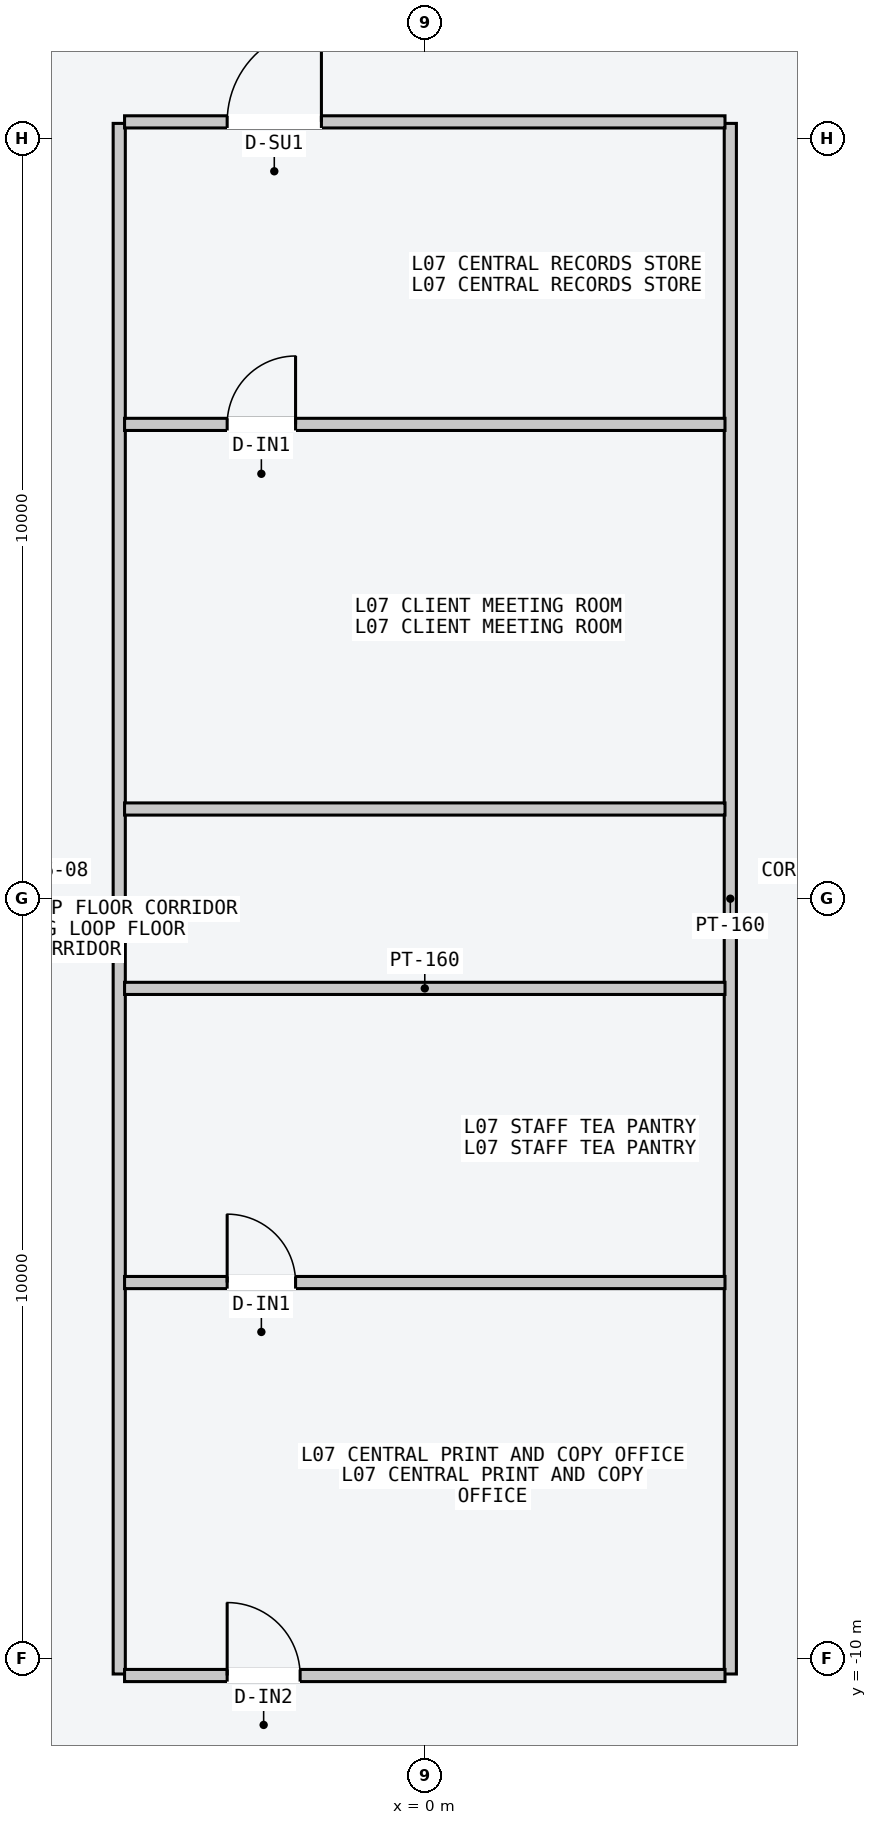
"""IFC4 building model, lengths in metres.
Left out: names, types, materials, properties, quantities, classifications, styles, units other than length and angle.
Written with IfcOpenShell. Run it as: python <this file> out.ifc"""

import sys

from ifc_helpers import new_model, si_unit, direction, frame, frame_2d, origin, place, context, subcontext, project, spatial, rectangle, extrude, element, fill, save


model = new_model("IFC4")
c1 = context("Model", 3, precision=1e-05, world=origin(), true_north=direction((0.0, 1.0)))
c2 = subcontext(c1, "Body", "Model", "MODEL_VIEW")
j1 = project(units=[si_unit("LENGTHUNIT", "METRE"), si_unit("PLANEANGLEUNIT", "RADIAN")], contexts=[c1])
p1 = place(None, origin())
s1 = spatial("IfcSite", under=j1, at=p1, CompositionType="ELEMENT")
p2 = place(p1, origin())
s2 = spatial("IfcBuilding", under=s1, at=p2, CompositionType="ELEMENT")
p3 = place(p2, frame((0.0, 0.0, 31.2)))
s3 = spatial("IfcBuildingStorey", under=s2, at=p3, CompositionType="ELEMENT", Elevation=31.2)
for number, where, z_axis, x_axis in (
    (1, (-4.02, -10.2, 0.0), (0.0, 0.0, 1.0), (0.0, 1.0, 0.0)),
    (2, (4.02, -10.2, 0.0), (0.0, 0.0, 1.0), (0.0, 1.0, 0.0)),
):
    element("IfcWall", number, at=place(p3, frame(where, z_axis=z_axis, x_axis=x_axis)), inside=s3, PredefinedType="PARTITIONING", context=c2, shape_type="SweptSolid", body=[
        extrude(rectangle(XDim=20.4, YDim=0.16, at=frame_2d((10.2, 0.0))), origin(), (0.0, 0.0, 1.0), 3.4),
    ])
p4 = place(p3, frame((-3.95, 1.18, 0.0), z_axis=(0.0, 0.0, 1.0), x_axis=(1.0, 0.0, 0.0)))
e3 = element("IfcWall", 3, at=p4, inside=s3, PredefinedType="PARTITIONING", context=c2, shape_type="SweptSolid", body=[
    extrude(rectangle(XDim=7.9, YDim=0.16, at=frame_2d((3.95, 0.0))), origin(), (0.0, 0.0, 1.0), 3.4),
])
p5 = place(p3, frame((-3.95, 10.22, 0.0), z_axis=(0.0, 0.0, 1.0), x_axis=(1.0, 0.0, 0.0)))
e4 = element("IfcWall", 4, at=p5, inside=s3, PredefinedType="PARTITIONING", context=c2, shape_type="SweptSolid", body=[
    extrude(rectangle(XDim=7.9, YDim=0.16, at=frame_2d((3.95, 0.0))), origin(), (0.0, 0.0, 1.0), 3.4),
])
p6 = place(p5, frame((1.35, 0.0, 0.0)))
e5 = element("IfcOpeningElement", 5, at=p6, cuts=e4, PredefinedType="OPENING", context=c2, shape_type="SweptSolid", body=[
    extrude(rectangle(XDim=1.24, YDim=2.24, at=frame_2d((0.62, 1.12))), frame((0.0, 0.09, 0.0), z_axis=(0.0, -1.0, 0.0), x_axis=(1.0, 0.0, 0.0)), (0.0, 0.0, 1.0), 0.18),
])
p7 = place(p3, frame((-3.95, -1.18, 0.0), z_axis=(0.0, 0.0, 1.0), x_axis=(1.0, 0.0, 0.0)))
e6 = element("IfcWall", 6, at=p7, inside=s3, PredefinedType="PARTITIONING", context=c2, shape_type="SweptSolid", body=[
    extrude(rectangle(XDim=7.9, YDim=0.16, at=frame_2d((3.95, 0.0))), origin(), (0.0, 0.0, 1.0), 3.4),
])
p8 = place(p3, frame((-3.95, -10.22, 0.0), z_axis=(0.0, 0.0, 1.0), x_axis=(1.0, 0.0, 0.0)))
e7 = element("IfcWall", 7, at=p8, inside=s3, PredefinedType="PARTITIONING", context=c2, shape_type="SweptSolid", body=[
    extrude(rectangle(XDim=7.9, YDim=0.16, at=frame_2d((3.95, 0.0))), origin(), (0.0, 0.0, 1.0), 3.4),
])
p9 = place(p8, frame((1.35, 0.0, 0.0)))
e8 = element("IfcOpeningElement", 8, at=p9, cuts=e7, PredefinedType="OPENING", context=c2, shape_type="SweptSolid", body=[
    extrude(rectangle(XDim=0.96, YDim=2.18, at=frame_2d((0.48, 1.09))), frame((0.0, 0.09, 0.0), z_axis=(0.0, -1.0, 0.0), x_axis=(1.0, 0.0, 0.0)), (0.0, 0.0, 1.0), 0.18),
])
p10 = place(p3, frame((-3.95, 6.24, 0.0), z_axis=(0.0, 0.0, 1.0), x_axis=(1.0, 0.0, 0.0)))
e9 = element("IfcWall", 9, at=p10, inside=s3, PredefinedType="PARTITIONING", context=c2, shape_type="SweptSolid", body=[
    extrude(rectangle(XDim=7.9, YDim=0.16, at=frame_2d((3.95, 0.0))), origin(), (0.0, 0.0, 1.0), 3.4),
])
p11 = place(p10, frame((1.35, 0.0, 0.0)))
e10 = element("IfcOpeningElement", 10, at=p11, cuts=e9, PredefinedType="OPENING", context=c2, shape_type="SweptSolid", body=[
    extrude(rectangle(XDim=0.9, YDim=2.15, at=frame_2d((0.45, 1.075))), frame((0.0, 0.09, 0.0), z_axis=(0.0, -1.0, 0.0), x_axis=(1.0, 0.0, 0.0)), (0.0, 0.0, 1.0), 0.18),
])
p12 = place(p3, frame((-3.95, -5.05, 0.0), z_axis=(0.0, 0.0, 1.0), x_axis=(1.0, 0.0, 0.0)))
e11 = element("IfcWall", 11, at=p12, inside=s3, PredefinedType="PARTITIONING", context=c2, shape_type="SweptSolid", body=[
    extrude(rectangle(XDim=7.9, YDim=0.16, at=frame_2d((3.95, 0.0))), origin(), (0.0, 0.0, 1.0), 3.4),
])
p13 = place(p12, frame((1.35, 0.0, 0.0)))
e12 = element("IfcOpeningElement", 12, at=p13, cuts=e11, PredefinedType="OPENING", context=c2, shape_type="SweptSolid", body=[
    extrude(rectangle(XDim=0.9, YDim=2.15, at=frame_2d((0.45, 1.075))), frame((0.0, 0.09, 0.0), z_axis=(0.0, -1.0, 0.0), x_axis=(1.0, 0.0, 0.0)), (0.0, 0.0, 1.0), 0.18),
])
p14 = place(p6, origin())
e13 = element("IfcDoor", 13, at=p14, inside=s3, OperationType="SINGLE_SWING_RIGHT", PredefinedType="DOOR", context=c2, shape_type="SweptSolid", body=[
    extrude(rectangle(XDim=1.24, YDim=2.24, at=frame_2d((0.62, 1.12))), frame((0.0, 0.025, 0.0), z_axis=(0.0, -1.0, 0.0), x_axis=(1.0, 0.0, 0.0)), (0.0, 0.0, 1.0), 0.05),
])
fill(e5, e13)
p15 = place(p9, origin())
e14 = element("IfcDoor", 14, at=p15, inside=s3, OperationType="SINGLE_SWING_LEFT", PredefinedType="DOOR", context=c2, shape_type="SweptSolid", body=[
    extrude(rectangle(XDim=0.96, YDim=2.18, at=frame_2d((0.48, 1.09))), frame((0.0, 0.025, 0.0), z_axis=(0.0, -1.0, 0.0), x_axis=(1.0, 0.0, 0.0)), (0.0, 0.0, 1.0), 0.05),
])
fill(e8, e14)
p16 = place(p11, origin())
e15 = element("IfcDoor", 15, at=p16, inside=s3, OperationType="SINGLE_SWING_RIGHT", PredefinedType="DOOR", context=c2, shape_type="SweptSolid", body=[
    extrude(rectangle(XDim=0.9, YDim=2.15, at=frame_2d((0.45, 1.075))), frame((0.0, 0.025, 0.0), z_axis=(0.0, -1.0, 0.0), x_axis=(1.0, 0.0, 0.0)), (0.0, 0.0, 1.0), 0.05),
])
fill(e10, e15)
p17 = place(p13, origin())
e16 = element("IfcDoor", 16, at=p17, inside=s3, OperationType="SINGLE_SWING_LEFT", PredefinedType="DOOR", context=c2, shape_type="SweptSolid", body=[
    extrude(rectangle(XDim=0.9, YDim=2.15, at=frame_2d((0.45, 1.075))), frame((0.0, 0.025, 0.0), z_axis=(0.0, -1.0, 0.0), x_axis=(1.0, 0.0, 0.0)), (0.0, 0.0, 1.0), 0.05),
])
fill(e12, e16)
save(model, sys.argv[1])
